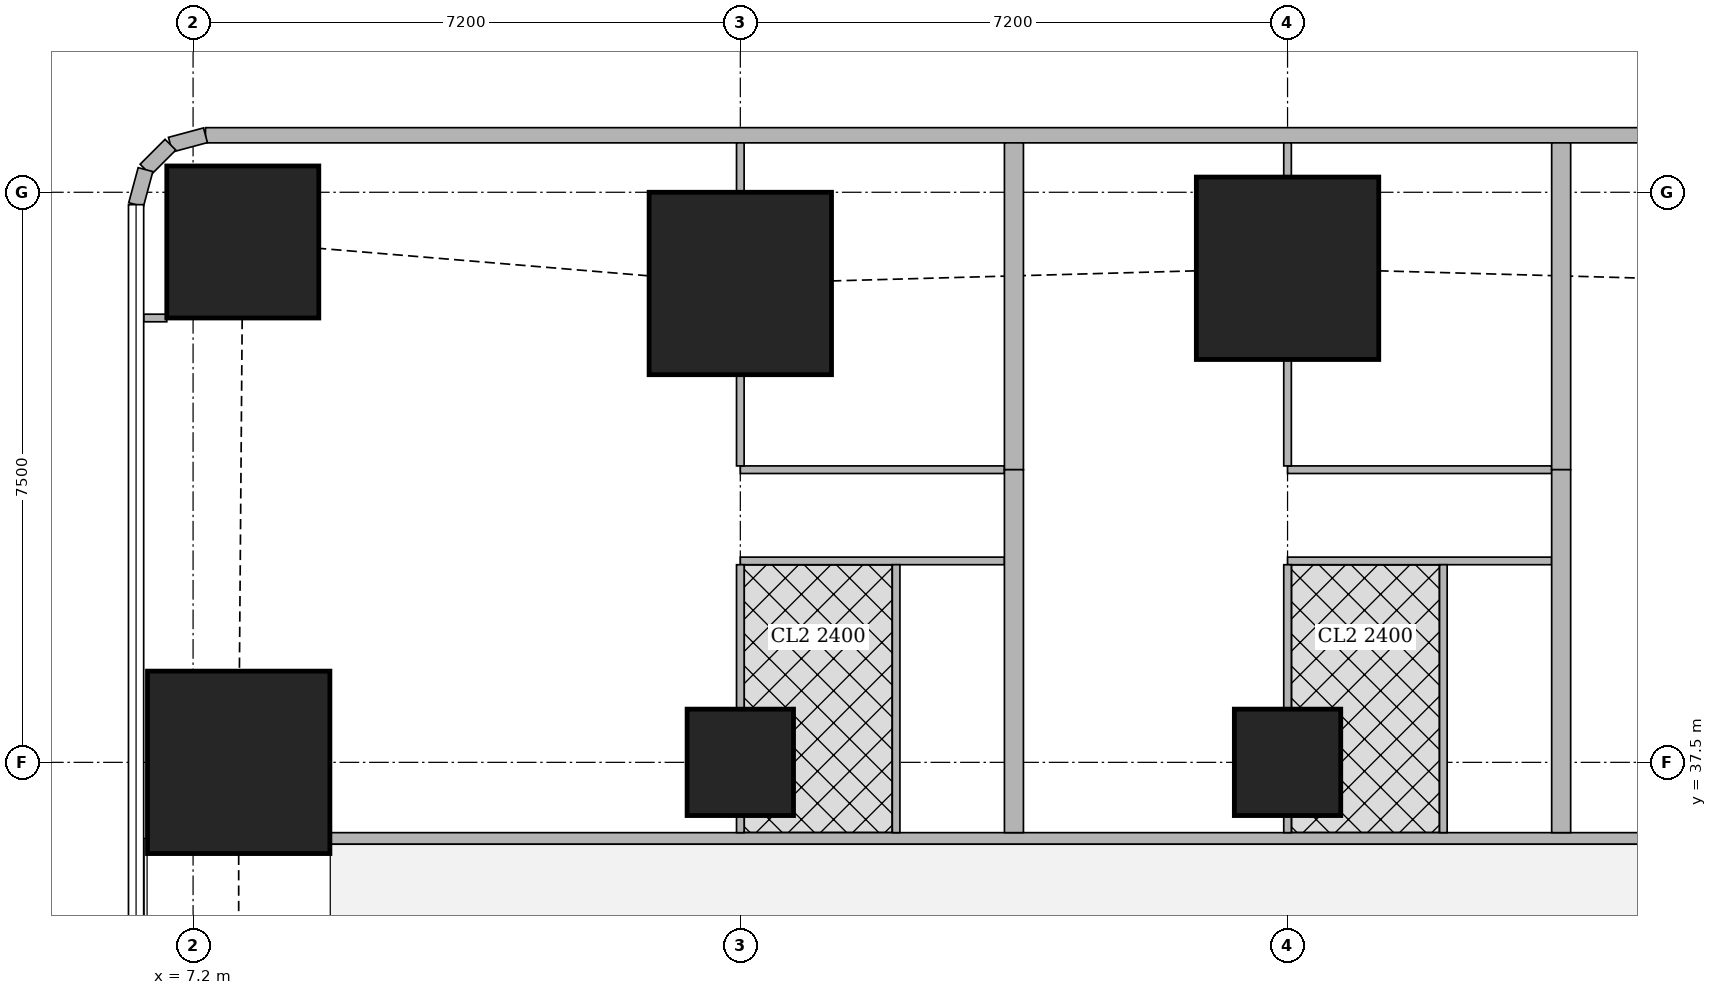
"""IFC4 building model, lengths in metres.
Left out: names, types, materials, properties, quantities, classifications, styles, units other than length and angle.
Written with IfcOpenShell. Run it as: python <this file> out.ifc"""

import sys

from ifc_helpers import new_model, si_unit, direction, frame, frame_2d, origin, origin_2d, place, context, subcontext, project, spatial, rectangle, extrude, element, fill, save


model = new_model("IFC4")
c1 = context("Model", 3, precision=1e-05, world=origin(), true_north=direction((0.0, 1.0)))
c2 = subcontext(c1, "Body", "Model", "MODEL_VIEW")
j1 = project(units=[si_unit("LENGTHUNIT", "METRE"), si_unit("PLANEANGLEUNIT", "RADIAN")], contexts=[c1])
p1 = place(None, origin())
s1 = spatial("IfcSite", under=j1, at=p1, CompositionType="ELEMENT")
p2 = place(p1, origin())
s2 = spatial("IfcBuilding", under=s1, at=p2, CompositionType="ELEMENT")
p3 = place(p2, frame((0.0, 0.0, 204.95)))
s3 = spatial("IfcBuildingStorey", under=s2, at=p3, CompositionType="ELEMENT", Elevation=204.95)
p4 = place(p3, frame((7.8, 37.5, 0.0), z_axis=(0.0, 0.0, 1.0), x_axis=(1.0, 0.0, 0.0)))
e1 = element("IfcColumn", 1, at=p4, inside=s3, PredefinedType="COLUMN", context=c2, shape_type="SweptSolid", body=[
    extrude(rectangle(XDim=2.4, YDim=2.4, at=origin_2d()), origin(), (0.0, 0.0, 1.0), 3.75),
])
for number, where, z_axis, x_axis in (
    (2, (14.4, 37.5, 0.0), (0.0, 0.0, 1.0), (1.0, 0.0, 0.0)),
    (3, (21.6, 37.5, 0.0), (0.0, 0.0, 1.0), (1.0, 0.0, 0.0)),
):
    element("IfcColumn", number, at=place(p3, frame(where, z_axis=z_axis, x_axis=x_axis)), inside=s3, PredefinedType="COLUMN", context=c2, shape_type="SweptSolid", body=[
        extrude(rectangle(XDim=1.4, YDim=1.4, at=origin_2d()), origin(), (0.0, 0.0, 1.0), 3.75),
    ])
p5 = place(p3, frame((7.854, 44.346, 0.0), z_axis=(0.0, 0.0, 1.0), x_axis=(1.0, 0.0, 0.0)))
e4 = element("IfcColumn", 4, at=p5, inside=s3, PredefinedType="COLUMN", context=c2, shape_type="SweptSolid", body=[
    extrude(rectangle(XDim=2.0, YDim=2.0, at=origin_2d()), origin(), (0.0, 0.0, 1.0), 3.75),
])
for number, where, z_axis, x_axis in (
    (5, (14.4, 43.8, 0.0), (0.0, 0.0, 1.0), (1.0, 0.0, 0.0)),
    (6, (21.6, 44.0, 0.0), (0.0, 0.0, 1.0), (1.0, 0.0, 0.0)),
):
    element("IfcColumn", number, at=place(p3, frame(where, z_axis=z_axis, x_axis=x_axis)), inside=s3, PredefinedType="COLUMN", context=c2, shape_type="SweptSolid", body=[
        extrude(rectangle(XDim=2.4, YDim=2.4, at=origin_2d()), origin(), (0.0, 0.0, 1.0), 3.75),
    ])
p6 = place(p3, frame((40.106, 45.75, 0.0), z_axis=(0.0, 0.0, 1.0), x_axis=(-1.0, 0.0, 0.0)))
e7 = element("IfcWall", 7, at=p6, inside=s3, PredefinedType="SOLIDWALL", context=c2, shape_type="SweptSolid", body=[
    extrude(rectangle(XDim=32.743, YDim=0.2, at=frame_2d((16.372, 0.0))), origin(), (0.0, 0.0, 1.0), 3.5),
])
p7 = place(p6, frame((8.606, 0.0, 0.9)))
e8 = element("IfcOpeningElement", 8, at=p7, cuts=e7, PredefinedType="OPENING", context=c2, shape_type="SweptSolid", body=[
    extrude(rectangle(XDim=1.8, YDim=1.5, at=frame_2d((0.9, 0.75))), frame((0.0, 0.11, 0.0), z_axis=(0.0, -1.0, 0.0), x_axis=(1.0, 0.0, 0.0)), (0.0, 0.0, 1.0), 0.22),
])
p8 = place(p6, frame((12.206, 0.0, 0.9)))
e9 = element("IfcOpeningElement", 9, at=p8, cuts=e7, PredefinedType="OPENING", context=c2, shape_type="SweptSolid", body=[
    extrude(rectangle(XDim=1.8, YDim=1.5, at=frame_2d((0.9, 0.75))), frame((0.0, 0.11, 0.0), z_axis=(0.0, -1.0, 0.0), x_axis=(1.0, 0.0, 0.0)), (0.0, 0.0, 1.0), 0.22),
])
p9 = place(p6, frame((15.806, 0.0, 0.9)))
e10 = element("IfcOpeningElement", 10, at=p9, cuts=e7, PredefinedType="OPENING", context=c2, shape_type="SweptSolid", body=[
    extrude(rectangle(XDim=1.8, YDim=1.5, at=frame_2d((0.9, 0.75))), frame((0.0, 0.11, 0.0), z_axis=(0.0, -1.0, 0.0), x_axis=(1.0, 0.0, 0.0)), (0.0, 0.0, 1.0), 0.22),
])
p10 = place(p6, frame((19.406, 0.0, 0.9)))
e11 = element("IfcOpeningElement", 11, at=p10, cuts=e7, PredefinedType="OPENING", context=c2, shape_type="SweptSolid", body=[
    extrude(rectangle(XDim=1.8, YDim=1.5, at=frame_2d((0.9, 0.75))), frame((0.0, 0.11, 0.0), z_axis=(0.0, -1.0, 0.0), x_axis=(1.0, 0.0, 0.0)), (0.0, 0.0, 1.0), 0.22),
])
p11 = place(p6, frame((23.006, 0.0, 0.9)))
e12 = element("IfcOpeningElement", 12, at=p11, cuts=e7, PredefinedType="OPENING", context=c2, shape_type="SweptSolid", body=[
    extrude(rectangle(XDim=1.8, YDim=1.5, at=frame_2d((0.9, 0.75))), frame((0.0, 0.11, 0.0), z_axis=(0.0, -1.0, 0.0), x_axis=(1.0, 0.0, 0.0)), (0.0, 0.0, 1.0), 0.22),
])
p12 = place(p6, frame((28.025, 0.0, 0.9)))
e13 = element("IfcOpeningElement", 13, at=p12, cuts=e7, PredefinedType="OPENING", context=c2, shape_type="SweptSolid", body=[
    extrude(rectangle(XDim=2.4, YDim=1.5, at=frame_2d((1.2, 0.75))), frame((0.0, 0.11, 0.0), z_axis=(0.0, -1.0, 0.0), x_axis=(1.0, 0.0, 0.0)), (0.0, 0.0, 1.0), 0.22),
])
p13 = place(p3, frame((7.363, 45.75, 0.0), z_axis=(0.0, 0.0, 1.0), x_axis=(-0.965655254015, -0.259826731483, 0.0)))
e14 = element("IfcWall", 14, at=p13, inside=s3, PredefinedType="SOLIDWALL", context=c2, shape_type="SweptSolid", body=[
    extrude(rectangle(XDim=0.477, YDim=0.2, at=frame_2d((0.239, 0.0))), origin(), (0.0, 0.0, 1.0), 3.5),
])
p14 = place(p3, frame((6.902, 45.626, 0.0), z_axis=(0.0, 0.0, 1.0), x_axis=(-0.707369890659, -0.706843573776, 0.0)))
e15 = element("IfcWall", 15, at=p14, inside=s3, PredefinedType="SOLIDWALL", context=c2, shape_type="SweptSolid", body=[
    extrude(rectangle(XDim=0.464, YDim=0.2, at=frame_2d((0.232, 0.0))), origin(), (0.0, 0.0, 1.0), 3.5),
])
p15 = place(p3, frame((6.574, 45.298, 0.0), z_axis=(0.0, 0.0, 1.0), x_axis=(-0.259698463175, -0.965689757751, 0.0)))
e16 = element("IfcWall", 16, at=p15, inside=s3, PredefinedType="SOLIDWALL", context=c2, shape_type="SweptSolid", body=[
    extrude(rectangle(XDim=0.478, YDim=0.2, at=frame_2d((0.239, 0.0))), origin(), (0.0, 0.0, 1.0), 3.5),
])
p16 = place(p3, frame((9.001, 36.5, 0.0), z_axis=(0.0, 0.0, 1.0), x_axis=(1.0, 0.0, 0.0)))
e17 = element("IfcWall", 17, at=p16, inside=s3, PredefinedType="SOLIDWALL", context=c2, shape_type="SweptSolid", body=[
    extrude(rectangle(XDim=25.764, YDim=0.15, at=frame_2d((12.882, 0.0))), origin(), (0.0, 0.0, 1.0), 3.5),
])
p17 = place(p16, frame((0.874, 0.0, 0.0)))
e18 = element("IfcOpeningElement", 18, at=p17, cuts=e17, PredefinedType="OPENING", context=c2, shape_type="SweptSolid", body=[
    extrude(rectangle(XDim=1.0, YDim=2.1, at=frame_2d((0.5, 1.05))), frame((0.0, 0.085, 0.0), z_axis=(0.0, -1.0, 0.0), x_axis=(1.0, 0.0, 0.0)), (0.0, 0.0, 1.0), 0.17),
])
p18 = place(p16, frame((10.099, 0.0, 0.0)))
e19 = element("IfcOpeningElement", 19, at=p18, cuts=e17, PredefinedType="OPENING", context=c2, shape_type="SweptSolid", body=[
    extrude(rectangle(XDim=1.0, YDim=2.1, at=frame_2d((0.5, 1.05))), frame((0.0, 0.085, 0.0), z_axis=(0.0, -1.0, 0.0), x_axis=(1.0, 0.0, 0.0)), (0.0, 0.0, 1.0), 0.17),
])
p19 = place(p16, frame((17.356, 0.0, 0.0)))
e20 = element("IfcOpeningElement", 20, at=p19, cuts=e17, PredefinedType="OPENING", context=c2, shape_type="SweptSolid", body=[
    extrude(rectangle(XDim=1.0, YDim=2.1, at=frame_2d((0.5, 1.05))), frame((0.0, 0.085, 0.0), z_axis=(0.0, -1.0, 0.0), x_axis=(1.0, 0.0, 0.0)), (0.0, 0.0, 1.0), 0.17),
])
p20 = place(p3, frame((6.854, 43.346, 0.0), z_axis=(0.0, 0.0, 1.0), x_axis=(-1.0, 0.0, 0.0)))
e21 = element("IfcWall", 21, at=p20, inside=s3, PredefinedType="PARTITIONING", context=c2, shape_type="SweptSolid", body=[
    extrude(rectangle(XDim=0.304, YDim=0.1, at=frame_2d((0.152, 0.0))), origin(), (0.0, 0.0, 1.0), 2.05),
])
p21 = place(p3, frame((14.4, 41.35, 0.0), z_axis=(0.0, 0.0, 1.0), x_axis=(1.0, 0.0, 0.0)))
e22 = element("IfcWall", 22, at=p21, inside=s3, PredefinedType="PARTITIONING", context=c2, shape_type="SweptSolid", body=[
    extrude(rectangle(XDim=3.475, YDim=0.1, at=frame_2d((1.738, 0.0))), origin(), (0.0, 0.0, 1.0), 3.5),
])
p22 = place(p21, frame((1.25, 0.0, 0.0)))
e23 = element("IfcOpeningElement", 23, at=p22, cuts=e22, PredefinedType="OPENING", context=c2, shape_type="SweptSolid", body=[
    extrude(rectangle(XDim=0.9, YDim=2.1, at=frame_2d((0.45, 1.05))), frame((0.0, 0.06, 0.0), z_axis=(0.0, -1.0, 0.0), x_axis=(1.0, 0.0, 0.0)), (0.0, 0.0, 1.0), 0.12),
])
p23 = place(p3, frame((14.4, 40.15, 0.0), z_axis=(0.0, 0.0, 1.0), x_axis=(1.0, 0.0, 0.0)))
e24 = element("IfcWall", 24, at=p23, inside=s3, PredefinedType="PARTITIONING", context=c2, shape_type="SweptSolid", body=[
    extrude(rectangle(XDim=3.475, YDim=0.1, at=frame_2d((1.738, 0.0))), origin(), (0.0, 0.0, 1.0), 3.5),
])
p24 = place(p23, frame((0.575, 0.0, 0.0)))
e25 = element("IfcOpeningElement", 25, at=p24, cuts=e24, PredefinedType="OPENING", context=c2, shape_type="SweptSolid", body=[
    extrude(rectangle(XDim=0.9, YDim=2.1, at=frame_2d((0.45, 1.05))), frame((0.0, 0.06, 0.0), z_axis=(0.0, -1.0, 0.0), x_axis=(1.0, 0.0, 0.0)), (0.0, 0.0, 1.0), 0.12),
])
p25 = place(p23, frame((2.375, 0.0, 0.0)))
e26 = element("IfcOpeningElement", 26, at=p25, cuts=e24, PredefinedType="OPENING", context=c2, shape_type="SweptSolid", body=[
    extrude(rectangle(XDim=0.9, YDim=2.1, at=frame_2d((0.45, 1.05))), frame((0.0, 0.06, 0.0), z_axis=(0.0, -1.0, 0.0), x_axis=(1.0, 0.0, 0.0)), (0.0, 0.0, 1.0), 0.12),
])
p26 = place(p3, frame((14.4, 41.4, 0.0), z_axis=(0.0, 0.0, 1.0), x_axis=(0.0, 1.0, 0.0)))
e27 = element("IfcWall", 27, at=p26, inside=s3, PredefinedType="PARTITIONING", context=c2, shape_type="SweptSolid", body=[
    extrude(rectangle(XDim=1.199, YDim=0.1, at=frame_2d((0.6, 0.0))), origin(), (0.0, 0.0, 1.0), 3.5),
])
p27 = place(p3, frame((14.4, 45.001, 0.0), z_axis=(0.0, 0.0, 1.0), x_axis=(0.0, 1.0, 0.0)))
e28 = element("IfcWall", 28, at=p27, inside=s3, PredefinedType="PARTITIONING", context=c2, shape_type="SweptSolid", body=[
    extrude(rectangle(XDim=0.649, YDim=0.1, at=frame_2d((0.324, 0.0))), origin(), (0.0, 0.0, 1.0), 3.5),
])
p28 = place(p3, frame((14.4, 36.575, 0.0), z_axis=(0.0, 0.0, 1.0), x_axis=(0.0, 1.0, 0.0)))
e29 = element("IfcWall", 29, at=p28, inside=s3, PredefinedType="PARTITIONING", context=c2, shape_type="SweptSolid", body=[
    extrude(rectangle(XDim=0.224, YDim=0.1, at=frame_2d((0.112, 0.0))), origin(), (0.0, 0.0, 1.0), 3.5),
])
p29 = place(p3, frame((14.4, 38.201, 0.0), z_axis=(0.0, 0.0, 1.0), x_axis=(0.0, 1.0, 0.0)))
e30 = element("IfcWall", 30, at=p29, inside=s3, PredefinedType="PARTITIONING", context=c2, shape_type="SweptSolid", body=[
    extrude(rectangle(XDim=1.899, YDim=0.1, at=frame_2d((0.95, 0.0))), origin(), (0.0, 0.0, 1.0), 3.5),
])
p30 = place(p3, frame((16.45, 36.575, 0.0), z_axis=(0.0, 0.0, 1.0), x_axis=(0.0, 1.0, 0.0)))
e31 = element("IfcWall", 31, at=p30, inside=s3, PredefinedType="PARTITIONING", context=c2, shape_type="SweptSolid", body=[
    extrude(rectangle(XDim=3.525, YDim=0.1, at=frame_2d((1.763, 0.0))), origin(), (0.0, 0.0, 1.0), 3.5),
])
p31 = place(p3, frame((21.6, 41.35, 0.0), z_axis=(0.0, 0.0, 1.0), x_axis=(1.0, 0.0, 0.0)))
e32 = element("IfcWall", 32, at=p31, inside=s3, PredefinedType="PARTITIONING", context=c2, shape_type="SweptSolid", body=[
    extrude(rectangle(XDim=3.475, YDim=0.1, at=frame_2d((1.737, 0.0))), origin(), (0.0, 0.0, 1.0), 3.5),
])
p32 = place(p31, frame((0.2, 0.0, 0.0)))
e33 = element("IfcOpeningElement", 33, at=p32, cuts=e32, PredefinedType="OPENING", context=c2, shape_type="SweptSolid", body=[
    extrude(rectangle(XDim=0.9, YDim=2.1, at=frame_2d((0.45, 1.05))), frame((0.0, 0.06, 0.0), z_axis=(0.0, -1.0, 0.0), x_axis=(1.0, 0.0, 0.0)), (0.0, 0.0, 1.0), 0.12),
])
p33 = place(p3, frame((21.6, 40.15, 0.0), z_axis=(0.0, 0.0, 1.0), x_axis=(1.0, 0.0, 0.0)))
e34 = element("IfcWall", 34, at=p33, inside=s3, PredefinedType="PARTITIONING", context=c2, shape_type="SweptSolid", body=[
    extrude(rectangle(XDim=3.475, YDim=0.1, at=frame_2d((1.737, 0.0))), origin(), (0.0, 0.0, 1.0), 3.5),
])
p34 = place(p33, frame((0.575, 0.0, 0.0)))
e35 = element("IfcOpeningElement", 35, at=p34, cuts=e34, PredefinedType="OPENING", context=c2, shape_type="SweptSolid", body=[
    extrude(rectangle(XDim=0.9, YDim=2.1, at=frame_2d((0.45, 1.05))), frame((0.0, 0.06, 0.0), z_axis=(0.0, -1.0, 0.0), x_axis=(1.0, 0.0, 0.0)), (0.0, 0.0, 1.0), 0.12),
])
p35 = place(p33, frame((2.375, 0.0, 0.0)))
e36 = element("IfcOpeningElement", 36, at=p35, cuts=e34, PredefinedType="OPENING", context=c2, shape_type="SweptSolid", body=[
    extrude(rectangle(XDim=0.9, YDim=2.1, at=frame_2d((0.45, 1.05))), frame((0.0, 0.06, 0.0), z_axis=(0.0, -1.0, 0.0), x_axis=(1.0, 0.0, 0.0)), (0.0, 0.0, 1.0), 0.12),
])
p36 = place(p3, frame((21.6, 41.4, 0.0), z_axis=(0.0, 0.0, 1.0), x_axis=(0.0, 1.0, 0.0)))
e37 = element("IfcWall", 37, at=p36, inside=s3, PredefinedType="PARTITIONING", context=c2, shape_type="SweptSolid", body=[
    extrude(rectangle(XDim=1.399, YDim=0.1, at=frame_2d((0.7, 0.0))), origin(), (0.0, 0.0, 1.0), 3.5),
])
p37 = place(p3, frame((21.6, 45.201, 0.0), z_axis=(0.0, 0.0, 1.0), x_axis=(0.0, 1.0, 0.0)))
e38 = element("IfcWall", 38, at=p37, inside=s3, PredefinedType="PARTITIONING", context=c2, shape_type="SweptSolid", body=[
    extrude(rectangle(XDim=0.449, YDim=0.1, at=frame_2d((0.225, 0.0))), origin(), (0.0, 0.0, 1.0), 3.5),
])
p38 = place(p3, frame((21.6, 36.575, 0.0), z_axis=(0.0, 0.0, 1.0), x_axis=(0.0, 1.0, 0.0)))
e39 = element("IfcWall", 39, at=p38, inside=s3, PredefinedType="PARTITIONING", context=c2, shape_type="SweptSolid", body=[
    extrude(rectangle(XDim=0.224, YDim=0.1, at=frame_2d((0.112, 0.0))), origin(), (0.0, 0.0, 1.0), 3.5),
])
p39 = place(p3, frame((21.6, 38.201, 0.0), z_axis=(0.0, 0.0, 1.0), x_axis=(0.0, 1.0, 0.0)))
e40 = element("IfcWall", 40, at=p39, inside=s3, PredefinedType="PARTITIONING", context=c2, shape_type="SweptSolid", body=[
    extrude(rectangle(XDim=1.899, YDim=0.1, at=frame_2d((0.95, 0.0))), origin(), (0.0, 0.0, 1.0), 3.5),
])
p40 = place(p3, frame((23.65, 36.575, 0.0), z_axis=(0.0, 0.0, 1.0), x_axis=(0.0, 1.0, 0.0)))
e41 = element("IfcWall", 41, at=p40, inside=s3, PredefinedType="PARTITIONING", context=c2, shape_type="SweptSolid", body=[
    extrude(rectangle(XDim=3.525, YDim=0.1, at=frame_2d((1.763, 0.0))), origin(), (0.0, 0.0, 1.0), 3.5),
])
p41 = place(p3, frame((18.0, 41.35, 0.0), z_axis=(0.0, 0.0, 1.0), x_axis=(0.0, 1.0, 0.0)))
e42 = element("IfcWall", 42, at=p41, inside=s3, PredefinedType="SOLIDWALL", context=c2, shape_type="SweptSolid", body=[
    extrude(rectangle(XDim=4.3, YDim=0.25, at=frame_2d((2.15, 0.0))), origin(), (0.0, 0.0, 1.0), 2.05),
])
p42 = place(p3, frame((18.0, 36.575, 0.0), z_axis=(0.0, 0.0, 1.0), x_axis=(0.0, 1.0, 0.0)))
e43 = element("IfcWall", 43, at=p42, inside=s3, PredefinedType="SOLIDWALL", context=c2, shape_type="SweptSolid", body=[
    extrude(rectangle(XDim=4.775, YDim=0.25, at=frame_2d((2.388, 0.0))), origin(), (0.0, 0.0, 1.0), 3.5),
])
p43 = place(p3, frame((25.2, 41.35, 0.0), z_axis=(0.0, 0.0, 1.0), x_axis=(0.0, 1.0, 0.0)))
e44 = element("IfcWall", 44, at=p43, inside=s3, PredefinedType="SOLIDWALL", context=c2, shape_type="SweptSolid", body=[
    extrude(rectangle(XDim=4.3, YDim=0.25, at=frame_2d((2.15, 0.0))), origin(), (0.0, 0.0, 1.0), 2.05),
])
p44 = place(p3, frame((25.2, 36.575, 0.0), z_axis=(0.0, 0.0, 1.0), x_axis=(0.0, 1.0, 0.0)))
e45 = element("IfcWall", 45, at=p44, inside=s3, PredefinedType="SOLIDWALL", context=c2, shape_type="SweptSolid", body=[
    extrude(rectangle(XDim=4.775, YDim=0.25, at=frame_2d((2.388, 0.0))), origin(), (0.0, 0.0, 1.0), 3.5),
])
p45 = place(p8, origin())
e46 = element("IfcWindow", 46, at=p45, inside=s3, PartitioningType="SINGLE_PANEL", PredefinedType="WINDOW", context=c2, shape_type="SweptSolid", body=[
    extrude(rectangle(XDim=1.8, YDim=1.5, at=frame_2d((0.9, 0.75))), frame((0.0, 0.03, 0.0), z_axis=(0.0, -1.0, 0.0), x_axis=(1.0, 0.0, 0.0)), (0.0, 0.0, 1.0), 0.06),
])
fill(e9, e46)
p46 = place(p9, origin())
e47 = element("IfcWindow", 47, at=p46, inside=s3, PartitioningType="SINGLE_PANEL", PredefinedType="WINDOW", context=c2, shape_type="SweptSolid", body=[
    extrude(rectangle(XDim=1.8, YDim=1.5, at=frame_2d((0.9, 0.75))), frame((0.0, 0.03, 0.0), z_axis=(0.0, -1.0, 0.0), x_axis=(1.0, 0.0, 0.0)), (0.0, 0.0, 1.0), 0.06),
])
fill(e10, e47)
p47 = place(p10, origin())
e48 = element("IfcWindow", 48, at=p47, inside=s3, PartitioningType="SINGLE_PANEL", PredefinedType="WINDOW", context=c2, shape_type="SweptSolid", body=[
    extrude(rectangle(XDim=1.8, YDim=1.5, at=frame_2d((0.9, 0.75))), frame((0.0, 0.03, 0.0), z_axis=(0.0, -1.0, 0.0), x_axis=(1.0, 0.0, 0.0)), (0.0, 0.0, 1.0), 0.06),
])
fill(e11, e48)
p48 = place(p11, origin())
e49 = element("IfcWindow", 49, at=p48, inside=s3, PartitioningType="SINGLE_PANEL", PredefinedType="WINDOW", context=c2, shape_type="SweptSolid", body=[
    extrude(rectangle(XDim=1.8, YDim=1.5, at=frame_2d((0.9, 0.75))), frame((0.0, 0.03, 0.0), z_axis=(0.0, -1.0, 0.0), x_axis=(1.0, 0.0, 0.0)), (0.0, 0.0, 1.0), 0.06),
])
fill(e12, e49)
p49 = place(p12, origin())
e50 = element("IfcWindow", 50, at=p49, inside=s3, PartitioningType="SINGLE_PANEL", PredefinedType="WINDOW", context=c2, shape_type="SweptSolid", body=[
    extrude(rectangle(XDim=2.4, YDim=1.5, at=frame_2d((1.2, 0.75))), frame((0.0, 0.03, 0.0), z_axis=(0.0, -1.0, 0.0), x_axis=(1.0, 0.0, 0.0)), (0.0, 0.0, 1.0), 0.06),
])
fill(e13, e50)
p50 = place(p22, origin())
e51 = element("IfcDoor", 51, at=p50, inside=s3, OperationType="SINGLE_SWING_LEFT", PredefinedType="DOOR", context=c2, shape_type="SweptSolid", body=[
    extrude(rectangle(XDim=0.9, YDim=2.1, at=frame_2d((0.45, 1.05))), frame((0.0, 0.025, 0.0), z_axis=(0.0, -1.0, 0.0), x_axis=(1.0, 0.0, 0.0)), (0.0, 0.0, 1.0), 0.05),
])
fill(e23, e51)
p51 = place(p24, origin())
e52 = element("IfcDoor", 52, at=p51, inside=s3, OperationType="SINGLE_SWING_RIGHT", PredefinedType="DOOR", context=c2, shape_type="SweptSolid", body=[
    extrude(rectangle(XDim=0.9, YDim=2.1, at=frame_2d((0.45, 1.05))), frame((0.0, 0.025, 0.0), z_axis=(0.0, -1.0, 0.0), x_axis=(1.0, 0.0, 0.0)), (0.0, 0.0, 1.0), 0.05),
])
fill(e25, e52)
p52 = place(p25, origin())
e53 = element("IfcDoor", 53, at=p52, inside=s3, OperationType="SINGLE_SWING_LEFT", PredefinedType="DOOR", context=c2, shape_type="SweptSolid", body=[
    extrude(rectangle(XDim=0.9, YDim=2.1, at=frame_2d((0.45, 1.05))), frame((0.0, 0.025, 0.0), z_axis=(0.0, -1.0, 0.0), x_axis=(1.0, 0.0, 0.0)), (0.0, 0.0, 1.0), 0.05),
])
fill(e26, e53)
p53 = place(p17, origin())
e54 = element("IfcDoor", 54, at=p53, inside=s3, OperationType="SINGLE_SWING_LEFT", PredefinedType="DOOR", context=c2, shape_type="SweptSolid", body=[
    extrude(rectangle(XDim=1.0, YDim=2.1, at=frame_2d((0.5, 1.05))), frame((0.0, 0.025, 0.0), z_axis=(0.0, -1.0, 0.0), x_axis=(1.0, 0.0, 0.0)), (0.0, 0.0, 1.0), 0.05),
])
fill(e18, e54)
p54 = place(p32, origin())
e55 = element("IfcDoor", 55, at=p54, inside=s3, OperationType="SINGLE_SWING_LEFT", PredefinedType="DOOR", context=c2, shape_type="SweptSolid", body=[
    extrude(rectangle(XDim=0.9, YDim=2.1, at=frame_2d((0.45, 1.05))), frame((0.0, 0.025, 0.0), z_axis=(0.0, -1.0, 0.0), x_axis=(1.0, 0.0, 0.0)), (0.0, 0.0, 1.0), 0.05),
])
fill(e33, e55)
p55 = place(p34, origin())
e56 = element("IfcDoor", 56, at=p55, inside=s3, OperationType="SINGLE_SWING_RIGHT", PredefinedType="DOOR", context=c2, shape_type="SweptSolid", body=[
    extrude(rectangle(XDim=0.9, YDim=2.1, at=frame_2d((0.45, 1.05))), frame((0.0, 0.025, 0.0), z_axis=(0.0, -1.0, 0.0), x_axis=(1.0, 0.0, 0.0)), (0.0, 0.0, 1.0), 0.05),
])
fill(e35, e56)
p56 = place(p35, origin())
e57 = element("IfcDoor", 57, at=p56, inside=s3, OperationType="SINGLE_SWING_LEFT", PredefinedType="DOOR", context=c2, shape_type="SweptSolid", body=[
    extrude(rectangle(XDim=0.9, YDim=2.1, at=frame_2d((0.45, 1.05))), frame((0.0, 0.025, 0.0), z_axis=(0.0, -1.0, 0.0), x_axis=(1.0, 0.0, 0.0)), (0.0, 0.0, 1.0), 0.05),
])
fill(e36, e57)
p57 = place(p18, origin())
e58 = element("IfcDoor", 58, at=p57, inside=s3, OperationType="SINGLE_SWING_LEFT", PredefinedType="DOOR", context=c2, shape_type="SweptSolid", body=[
    extrude(rectangle(XDim=1.0, YDim=2.1, at=frame_2d((0.5, 1.05))), frame((0.0, 0.025, 0.0), z_axis=(0.0, -1.0, 0.0), x_axis=(1.0, 0.0, 0.0)), (0.0, 0.0, 1.0), 0.05),
])
fill(e19, e58)
save(model, sys.argv[1])
